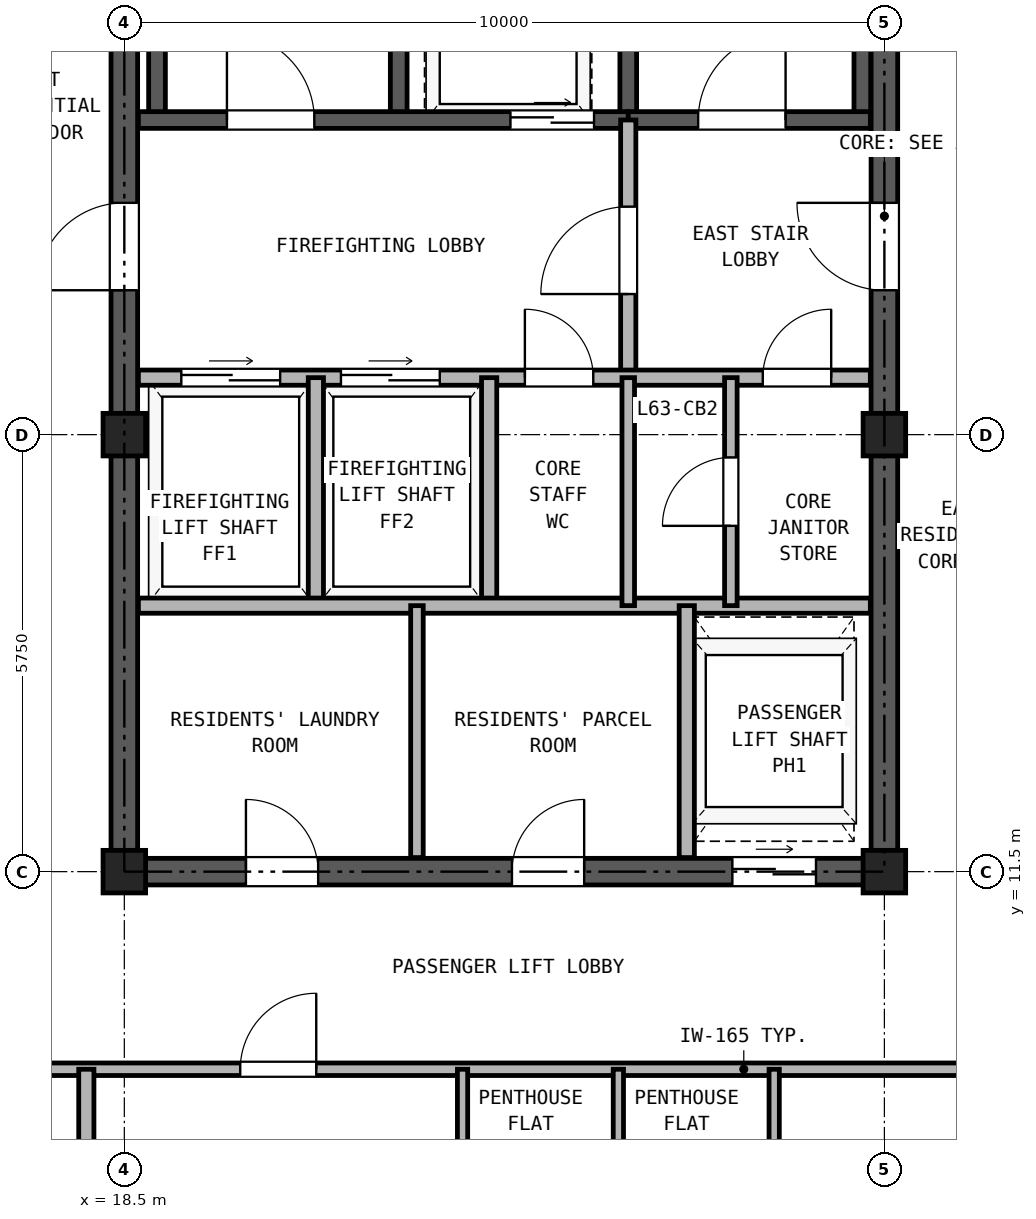
"""IFC4 building model, lengths in metres.
Left out: names, types, materials, properties, quantities, classifications, styles, units other than length and angle.
Written with IfcOpenShell. Run it as: python <this file> out.ifc"""

import sys

from ifc_helpers import new_model, si_unit, direction, frame, frame_2d, origin, origin_2d, place, context, subcontext, project, spatial, rectangle, hollow_rectangle, extrude, source, transform, mapped, element, fill, save


model = new_model("IFC4")
c1 = context("Model", 3, precision=1e-05, world=origin(), true_north=direction((0.0, 1.0)))
c2 = subcontext(c1, "Body", "Model", "MODEL_VIEW")
j1 = project(units=[si_unit("LENGTHUNIT", "METRE"), si_unit("PLANEANGLEUNIT", "RADIAN")], contexts=[c1])
p1 = place(None, origin())
s1 = spatial("IfcSite", under=j1, at=p1, CompositionType="ELEMENT")
p2 = place(p1, origin())
s2 = spatial("IfcBuilding", under=s1, at=p2, CompositionType="ELEMENT")
p3 = place(p2, frame((0.0, 0.0, 223.3)))
s3 = spatial("IfcBuildingStorey", under=s2, at=p3, CompositionType="ELEMENT", Elevation=223.3)
m1 = source(origin(), c2, "Body", "SweptSolid", [
    extrude(hollow_rectangle(XDim=0.56, YDim=0.56, WallThickness=0.03, at=origin_2d()), origin(), (0.0, 0.0, 1.0), 2.98),
])
for number, where, z_axis, x_axis in (
    (1, (18.5, 11.5, 0.0), (0.0, 0.0, 1.0), (1.0, 0.0, 0.0)),
    (2, (18.5, 17.25, 0.0), (0.0, 0.0, 1.0), (1.0, 0.0, 0.0)),
    (3, (28.5, 11.5, 0.0), (0.0, 0.0, 1.0), (1.0, 0.0, 0.0)),
    (4, (28.5, 17.25, 0.0), (0.0, 0.0, 1.0), (1.0, 0.0, 0.0)),
):
    element("IfcColumn", number, at=place(p3, frame(where, z_axis=z_axis, x_axis=x_axis)), inside=s3, PredefinedType="COLUMN", context=c2, shape_type="MappedRepresentation", body=[
        mapped(m1, transform((0.0, 0.0, 0.0), x_axis=(1.0, 0.0, 0.0), y_axis=(0.0, 1.0, 0.0), z_axis=(0.0, 0.0, 1.0), scale=1.0)),
    ])
p4 = place(p3, frame((18.325, 11.5, 0.0), z_axis=(0.0, 0.0, 1.0), x_axis=(1.0, 0.0, 0.0)))
e5 = element("IfcWall", 5, at=p4, inside=s3, PredefinedType="SHEAR", context=c2, shape_type="SweptSolid", body=[
    extrude(rectangle(XDim=10.35, YDim=0.35, at=frame_2d((5.175, 0.0))), origin(), (0.0, 0.0, 1.0), 2.98),
])
p5 = place(p4, frame((1.775, 0.0, 0.0)))
e6 = element("IfcOpeningElement", 6, at=p5, cuts=e5, PredefinedType="OPENING", context=c2, shape_type="SweptSolid", body=[
    extrude(rectangle(XDim=0.95, YDim=2.15, at=frame_2d((0.475, 1.075))), frame((0.0, 0.185, 0.0), z_axis=(0.0, -1.0, 0.0), x_axis=(1.0, 0.0, 0.0)), (0.0, 0.0, 1.0), 0.37),
])
p6 = place(p4, frame((5.275, 0.0, 0.0)))
e7 = element("IfcOpeningElement", 7, at=p6, cuts=e5, PredefinedType="OPENING", context=c2, shape_type="SweptSolid", body=[
    extrude(rectangle(XDim=0.95, YDim=2.15, at=frame_2d((0.475, 1.075))), frame((0.0, 0.185, 0.0), z_axis=(0.0, -1.0, 0.0), x_axis=(1.0, 0.0, 0.0)), (0.0, 0.0, 1.0), 0.37),
])
p7 = place(p4, frame((8.175, 0.0, 0.0)))
e8 = element("IfcOpeningElement", 8, at=p7, cuts=e5, PredefinedType="OPENING", context=c2, shape_type="SweptSolid", body=[
    extrude(rectangle(XDim=1.1, YDim=2.25, at=frame_2d((0.55, 1.125))), frame((0.0, 0.185, 0.0), z_axis=(0.0, -1.0, 0.0), x_axis=(1.0, 0.0, 0.0)), (0.0, 0.0, 1.0), 0.37),
])
p8 = place(p3, frame((18.5, 11.675, 0.0), z_axis=(0.0, 0.0, 1.0), x_axis=(0.0, 1.0, 0.0)))
e9 = element("IfcWall", 9, at=p8, inside=s3, PredefinedType="SHEAR", context=c2, shape_type="SweptSolid", body=[
    extrude(rectangle(XDim=16.9, YDim=0.35, at=frame_2d((8.45, 0.0))), origin(), (0.0, 0.0, 1.0), 2.98),
])
p9 = place(p8, frame((7.475, 0.0, 0.0)))
e10 = element("IfcOpeningElement", 10, at=p9, cuts=e9, PredefinedType="OPENING", context=c2, shape_type="SweptSolid", body=[
    extrude(rectangle(XDim=1.15, YDim=2.2, at=frame_2d((0.575, 1.1))), frame((0.0, 0.185, 0.0), z_axis=(0.0, -1.0, 0.0), x_axis=(1.0, 0.0, 0.0)), (0.0, 0.0, 1.0), 0.37),
])
p10 = place(p3, frame((28.5, 11.675, 0.0), z_axis=(0.0, 0.0, 1.0), x_axis=(0.0, 1.0, 0.0)))
e11 = element("IfcWall", 11, at=p10, inside=s3, PredefinedType="SHEAR", context=c2, shape_type="SweptSolid", body=[
    extrude(rectangle(XDim=16.9, YDim=0.35, at=frame_2d((8.45, 0.0))), origin(), (0.0, 0.0, 1.0), 2.98),
])
p11 = place(p10, frame((7.475, 0.0, 0.0)))
e12 = element("IfcOpeningElement", 12, at=p11, cuts=e11, PredefinedType="OPENING", context=c2, shape_type="SweptSolid", body=[
    extrude(rectangle(XDim=1.15, YDim=2.2, at=frame_2d((0.575, 1.1))), frame((0.0, 0.185, 0.0), z_axis=(0.0, -1.0, 0.0), x_axis=(1.0, 0.0, 0.0)), (0.0, 0.0, 1.0), 0.37),
])
for number, where, z_axis, x_axis in (
    (13, (18.93, 21.39, 0.0), (0.0, 0.0, 1.0), (0.0, 1.0, 0.0)),
    (14, (22.11, 21.39, 0.0), (0.0, 0.0, 1.0), (0.0, 1.0, 0.0)),
    (15, (25.13, 21.39, 0.0), (0.0, 0.0, 1.0), (0.0, 1.0, 0.0)),
):
    element("IfcWall", number, at=place(p3, frame(where, z_axis=z_axis, x_axis=x_axis)), inside=s3, PredefinedType="SOLIDWALL", context=c2, shape_type="SweptSolid", body=[
        extrude(rectangle(XDim=7.11, YDim=0.22, at=frame_2d((3.555, 0.0))), origin(), (0.0, 0.0, 1.0), 2.98),
    ])
p12 = place(p3, frame((28.21, 21.39, 0.0), z_axis=(0.0, 0.0, 1.0), x_axis=(0.0, 1.0, 0.0)))
e16 = element("IfcWall", 16, at=p12, inside=s3, PredefinedType="SOLIDWALL", context=c2, shape_type="SweptSolid", body=[
    extrude(rectangle(XDim=6.945, YDim=0.22, at=frame_2d((3.473, 0.0))), origin(), (0.0, 0.0, 1.0), 2.98),
])
p13 = place(p3, frame((18.685, 21.39, 0.0), z_axis=(0.0, 0.0, 1.0), x_axis=(1.0, 0.0, 0.0)))
e17 = element("IfcWall", 17, at=p13, inside=s3, PredefinedType="SOLIDWALL", context=c2, shape_type="SweptSolid", body=[
    extrude(rectangle(XDim=6.445, YDim=0.22, at=frame_2d((3.222, 0.0))), origin(), (0.0, 0.0, 1.0), 2.98),
])
p14 = place(p13, frame((1.165, 0.0, 0.0)))
e18 = element("IfcOpeningElement", 18, at=p14, cuts=e17, PredefinedType="OPENING", context=c2, shape_type="SweptSolid", body=[
    extrude(rectangle(XDim=1.15, YDim=2.2, at=frame_2d((0.575, 1.1))), frame((0.0, 0.12, 0.0), z_axis=(0.0, -1.0, 0.0), x_axis=(1.0, 0.0, 0.0)), (0.0, 0.0, 1.0), 0.24),
])
p15 = place(p13, frame((4.895, 0.0, 0.0)))
e19 = element("IfcOpeningElement", 19, at=p15, cuts=e17, PredefinedType="OPENING", context=c2, shape_type="SweptSolid", body=[
    extrude(rectangle(XDim=1.1, YDim=2.25, at=frame_2d((0.55, 1.125))), frame((0.0, 0.12, 0.0), z_axis=(0.0, -1.0, 0.0), x_axis=(1.0, 0.0, 0.0)), (0.0, 0.0, 1.0), 0.24),
])
p16 = place(p3, frame((25.13, 21.39, 0.0), z_axis=(0.0, 0.0, 1.0), x_axis=(1.0, 0.0, 0.0)))
e20 = element("IfcWall", 20, at=p16, inside=s3, PredefinedType="SOLIDWALL", context=c2, shape_type="SweptSolid", body=[
    extrude(rectangle(XDim=3.185, YDim=0.22, at=frame_2d((1.593, 0.0))), origin(), (0.0, 0.0, 1.0), 2.98),
])
p17 = place(p16, frame((0.92, 0.0, 0.0)))
e21 = element("IfcOpeningElement", 21, at=p17, cuts=e20, PredefinedType="OPENING", context=c2, shape_type="SweptSolid", body=[
    extrude(rectangle(XDim=1.15, YDim=2.2, at=frame_2d((0.575, 1.1))), frame((0.0, 0.12, 0.0), z_axis=(0.0, -1.0, 0.0), x_axis=(1.0, 0.0, 0.0)), (0.0, 0.0, 1.0), 0.24),
])
p18 = place(p3, frame((25.13, 18.0, 0.0), z_axis=(0.0, 0.0, 1.0), x_axis=(0.0, 1.0, 0.0)))
e22 = element("IfcWall", 22, at=p18, inside=s3, PredefinedType="PARTITIONING", context=c2, shape_type="SweptSolid", body=[
    extrude(rectangle(XDim=3.39, YDim=0.2, at=frame_2d((1.695, 0.0))), origin(), (0.0, 0.0, 1.0), 2.98),
])
p19 = place(p18, frame((1.1, 0.0, 0.0)))
e23 = element("IfcOpeningElement", 23, at=p19, cuts=e22, PredefinedType="OPENING", context=c2, shape_type="SweptSolid", body=[
    extrude(rectangle(XDim=1.15, YDim=2.2, at=frame_2d((0.575, 1.1))), frame((0.0, 0.11, 0.0), z_axis=(0.0, -1.0, 0.0), x_axis=(1.0, 0.0, 0.0)), (0.0, 0.0, 1.0), 0.22),
])
p20 = place(p3, frame((18.685, 18.0, 0.0), z_axis=(0.0, 0.0, 1.0), x_axis=(1.0, 0.0, 0.0)))
e24 = element("IfcWall", 24, at=p20, inside=s3, PredefinedType="PARTITIONING", context=c2, shape_type="SweptSolid", body=[
    extrude(rectangle(XDim=9.63, YDim=0.2, at=frame_2d((4.815, 0.0))), origin(), (0.0, 0.0, 1.0), 2.98),
])
p21 = place(p20, frame((0.565, 0.0, 0.0)))
e25 = element("IfcOpeningElement", 25, at=p21, cuts=e24, PredefinedType="OPENING", context=c2, shape_type="SweptSolid", body=[
    extrude(rectangle(XDim=1.3, YDim=2.3, at=frame_2d((0.65, 1.15))), frame((0.0, 0.11, 0.0), z_axis=(0.0, -1.0, 0.0), x_axis=(1.0, 0.0, 0.0)), (0.0, 0.0, 1.0), 0.22),
])
p22 = place(p20, frame((2.665, 0.0, 0.0)))
e26 = element("IfcOpeningElement", 26, at=p22, cuts=e24, PredefinedType="OPENING", context=c2, shape_type="SweptSolid", body=[
    extrude(rectangle(XDim=1.3, YDim=2.3, at=frame_2d((0.65, 1.15))), frame((0.0, 0.11, 0.0), z_axis=(0.0, -1.0, 0.0), x_axis=(1.0, 0.0, 0.0)), (0.0, 0.0, 1.0), 0.22),
])
p23 = place(p20, frame((5.085, 0.0, 0.0)))
e27 = element("IfcOpeningElement", 27, at=p23, cuts=e24, PredefinedType="OPENING", context=c2, shape_type="SweptSolid", body=[
    extrude(rectangle(XDim=0.9, YDim=2.05, at=frame_2d((0.45, 1.025))), frame((0.0, 0.11, 0.0), z_axis=(0.0, -1.0, 0.0), x_axis=(1.0, 0.0, 0.0)), (0.0, 0.0, 1.0), 0.22),
])
p24 = place(p20, frame((8.215, 0.0, 0.0)))
e28 = element("IfcOpeningElement", 28, at=p24, cuts=e24, PredefinedType="OPENING", context=c2, shape_type="SweptSolid", body=[
    extrude(rectangle(XDim=0.9, YDim=2.05, at=frame_2d((0.45, 1.025))), frame((0.0, 0.11, 0.0), z_axis=(0.0, -1.0, 0.0), x_axis=(1.0, 0.0, 0.0)), (0.0, 0.0, 1.0), 0.22),
])
for number, where, z_axis, x_axis in (
    (29, (21.02, 15.0, 0.0), (0.0, 0.0, 1.0), (0.0, 1.0, 0.0)),
    (30, (23.3, 15.0, 0.0), (0.0, 0.0, 1.0), (0.0, 1.0, 0.0)),
):
    element("IfcWall", number, at=place(p3, frame(where, z_axis=z_axis, x_axis=x_axis)), inside=s3, PredefinedType="PARTITIONING", context=c2, shape_type="SweptSolid", body=[
        extrude(rectangle(XDim=3.0, YDim=0.2, at=frame_2d((1.5, 0.0))), origin(), (0.0, 0.0, 1.0), 2.98),
    ])
p25 = place(p3, frame((18.685, 15.0, 0.0), z_axis=(0.0, 0.0, 1.0), x_axis=(1.0, 0.0, 0.0)))
e31 = element("IfcWall", 31, at=p25, inside=s3, PredefinedType="PARTITIONING", context=c2, shape_type="SweptSolid", body=[
    extrude(rectangle(XDim=9.63, YDim=0.2, at=frame_2d((4.815, 0.0))), origin(), (0.0, 0.0, 1.0), 2.98),
])
p26 = place(p3, frame((25.13, 15.0, 0.0), z_axis=(0.0, 0.0, 1.0), x_axis=(0.0, 1.0, 0.0)))
e32 = element("IfcWall", 32, at=p26, inside=s3, PredefinedType="PARTITIONING", context=c2, shape_type="SweptSolid", body=[
    extrude(rectangle(XDim=3.0, YDim=0.165, at=frame_2d((1.5, 0.0))), origin(), (0.0, 0.0, 1.0), 2.98),
])
p27 = place(p3, frame((26.48, 15.0, 0.0), z_axis=(0.0, 0.0, 1.0), x_axis=(0.0, 1.0, 0.0)))
e33 = element("IfcWall", 33, at=p27, inside=s3, PredefinedType="PARTITIONING", context=c2, shape_type="SweptSolid", body=[
    extrude(rectangle(XDim=3.0, YDim=0.165, at=frame_2d((1.5, 0.0))), origin(), (0.0, 0.0, 1.0), 2.98),
])
p28 = place(p27, frame((1.05, 0.0, 0.0)))
e34 = element("IfcOpeningElement", 34, at=p28, cuts=e33, PredefinedType="OPENING", context=c2, shape_type="SweptSolid", body=[
    extrude(rectangle(XDim=0.9, YDim=2.05, at=frame_2d((0.45, 1.025))), frame((0.0, 0.093, 0.0), z_axis=(0.0, -1.0, 0.0), x_axis=(1.0, 0.0, 0.0)), (0.0, 0.0, 1.0), 0.185),
])
p29 = place(p3, frame((22.35, 11.685, 0.0), z_axis=(0.0, 0.0, 1.0), x_axis=(0.0, 1.0, 0.0)))
e35 = element("IfcWall", 35, at=p29, inside=s3, PredefinedType="PARTITIONING", context=c2, shape_type="SweptSolid", body=[
    extrude(rectangle(XDim=3.315, YDim=0.165, at=frame_2d((1.657, 0.0))), origin(), (0.0, 0.0, 1.0), 2.98),
])
p30 = place(p3, frame((25.9, 11.685, 0.0), z_axis=(0.0, 0.0, 1.0), x_axis=(0.0, 1.0, 0.0)))
e36 = element("IfcWall", 36, at=p30, inside=s3, PredefinedType="PARTITIONING", context=c2, shape_type="SweptSolid", body=[
    extrude(rectangle(XDim=3.315, YDim=0.2, at=frame_2d((1.657, 0.0))), origin(), (0.0, 0.0, 1.0), 2.98),
])
p31 = place(p3, frame((5.36, 8.9, 0.0), z_axis=(0.0, 0.0, 1.0), x_axis=(1.0, 0.0, 0.0)))
e37 = element("IfcWall", 37, at=p31, inside=s3, PredefinedType="PARTITIONING", context=c2, shape_type="SweptSolid", body=[
    extrude(rectangle(XDim=36.28, YDim=0.165, at=frame_2d((18.14, 0.0))), origin(), (0.0, 0.0, 1.0), 2.98),
])
p32 = place(p31, frame((8.865, 0.0, 0.0)))
e38 = element("IfcOpeningElement", 38, at=p32, cuts=e37, PredefinedType="OPENING", context=c2, shape_type="SweptSolid", body=[
    extrude(rectangle(XDim=1.0, YDim=2.15, at=frame_2d((0.5, 1.075))), frame((0.0, 0.093, 0.0), z_axis=(0.0, -1.0, 0.0), x_axis=(1.0, 0.0, 0.0)), (0.0, 0.0, 1.0), 0.185),
])
p33 = place(p31, frame((14.665, 0.0, 0.0)))
e39 = element("IfcOpeningElement", 39, at=p33, cuts=e37, PredefinedType="OPENING", context=c2, shape_type="SweptSolid", body=[
    extrude(rectangle(XDim=1.0, YDim=2.15, at=frame_2d((0.5, 1.075))), frame((0.0, 0.093, 0.0), z_axis=(0.0, -1.0, 0.0), x_axis=(1.0, 0.0, 0.0)), (0.0, 0.0, 1.0), 0.185),
])
p34 = place(p31, frame((26.915, 0.0, 0.0)))
e40 = element("IfcOpeningElement", 40, at=p34, cuts=e37, PredefinedType="OPENING", context=c2, shape_type="SweptSolid", body=[
    extrude(rectangle(XDim=1.0, YDim=2.15, at=frame_2d((0.5, 1.075))), frame((0.0, 0.093, 0.0), z_axis=(0.0, -1.0, 0.0), x_axis=(1.0, 0.0, 0.0)), (0.0, 0.0, 1.0), 0.185),
])
p35 = place(p3, frame((18.0, 0.16, 0.0), z_axis=(0.0, 0.0, 1.0), x_axis=(0.0, 1.0, 0.0)))
e41 = element("IfcWall", 41, at=p35, inside=s3, PredefinedType="PARTITIONING", context=c2, shape_type="SweptSolid", body=[
    extrude(rectangle(XDim=8.74, YDim=0.2, at=frame_2d((4.37, 0.0))), origin(), (0.0, 0.0, 1.0), 2.98),
])
for number, where, z_axis, x_axis in (
    (42, (22.95, 6.75, 0.0), (0.0, 0.0, 1.0), (0.0, 1.0, 0.0)),
    (43, (25.0, 6.75, 0.0), (0.0, 0.0, 1.0), (0.0, 1.0, 0.0)),
    (44, (27.05, 6.75, 0.0), (0.0, 0.0, 1.0), (0.0, 1.0, 0.0)),
):
    element("IfcWall", number, at=place(p3, frame(where, z_axis=z_axis, x_axis=x_axis)), inside=s3, PredefinedType="PARTITIONING", context=c2, shape_type="SweptSolid", body=[
        extrude(rectangle(XDim=2.15, YDim=0.135, at=frame_2d((1.075, 0.0))), origin(), (0.0, 0.0, 1.0), 2.98),
    ])
p36 = place(p14, frame((1.15, 0.0, 0.0), z_axis=(0.0, 0.0, 1.0), x_axis=(-1.0, 0.0, 0.0)))
e45 = element("IfcDoor", 45, at=p36, inside=s3, OperationType="SINGLE_SWING_LEFT", PredefinedType="DOOR", context=c2, shape_type="SweptSolid", body=[
    extrude(rectangle(XDim=1.15, YDim=2.2, at=frame_2d((0.575, 1.1))), frame((0.0, 0.025, 0.0), z_axis=(0.0, -1.0, 0.0), x_axis=(1.0, 0.0, 0.0)), (0.0, 0.0, 1.0), 0.05),
])
fill(e18, e45)
p37 = place(p17, frame((1.15, 0.0, 0.0), z_axis=(0.0, 0.0, 1.0), x_axis=(-1.0, 0.0, 0.0)))
e46 = element("IfcDoor", 46, at=p37, inside=s3, OperationType="SINGLE_SWING_RIGHT", PredefinedType="DOOR", context=c2, shape_type="SweptSolid", body=[
    extrude(rectangle(XDim=1.15, YDim=2.2, at=frame_2d((0.575, 1.1))), frame((0.0, 0.025, 0.0), z_axis=(0.0, -1.0, 0.0), x_axis=(1.0, 0.0, 0.0)), (0.0, 0.0, 1.0), 0.05),
])
fill(e21, e46)
p38 = place(p15, frame((1.1, 0.0, 0.0), z_axis=(0.0, 0.0, 1.0), x_axis=(-1.0, 0.0, 0.0)))
e47 = element("IfcDoor", 47, at=p38, inside=s3, OperationType="DOUBLE_DOOR_SLIDING", PredefinedType="DOOR", context=c2, shape_type="SweptSolid", body=[
    extrude(rectangle(XDim=1.1, YDim=2.25, at=frame_2d((0.55, 1.125))), frame((0.0, 0.025, 0.0), z_axis=(0.0, -1.0, 0.0), x_axis=(1.0, 0.0, 0.0)), (0.0, 0.0, 1.0), 0.05),
])
fill(e19, e47)
p39 = place(p19, origin())
e48 = element("IfcDoor", 48, at=p39, inside=s3, OperationType="SINGLE_SWING_LEFT", PredefinedType="DOOR", context=c2, shape_type="SweptSolid", body=[
    extrude(rectangle(XDim=1.15, YDim=2.2, at=frame_2d((0.575, 1.1))), frame((0.0, 0.025, 0.0), z_axis=(0.0, -1.0, 0.0), x_axis=(1.0, 0.0, 0.0)), (0.0, 0.0, 1.0), 0.05),
])
fill(e23, e48)
p40 = place(p21, origin())
e49 = element("IfcDoor", 49, at=p40, inside=s3, OperationType="DOUBLE_DOOR_SLIDING", PredefinedType="DOOR", context=c2, shape_type="SweptSolid", body=[
    extrude(rectangle(XDim=1.3, YDim=2.3, at=frame_2d((0.65, 1.15))), frame((0.0, 0.025, 0.0), z_axis=(0.0, -1.0, 0.0), x_axis=(1.0, 0.0, 0.0)), (0.0, 0.0, 1.0), 0.05),
])
fill(e25, e49)
p41 = place(p22, origin())
e50 = element("IfcDoor", 50, at=p41, inside=s3, OperationType="DOUBLE_DOOR_SLIDING", PredefinedType="DOOR", context=c2, shape_type="SweptSolid", body=[
    extrude(rectangle(XDim=1.3, YDim=2.3, at=frame_2d((0.65, 1.15))), frame((0.0, 0.025, 0.0), z_axis=(0.0, -1.0, 0.0), x_axis=(1.0, 0.0, 0.0)), (0.0, 0.0, 1.0), 0.05),
])
fill(e26, e50)
p42 = place(p23, frame((0.9, 0.0, 0.0), z_axis=(0.0, 0.0, 1.0), x_axis=(-1.0, 0.0, 0.0)))
e51 = element("IfcDoor", 51, at=p42, inside=s3, OperationType="SINGLE_SWING_LEFT", PredefinedType="DOOR", context=c2, shape_type="SweptSolid", body=[
    extrude(rectangle(XDim=0.9, YDim=2.05, at=frame_2d((0.45, 1.025))), frame((0.0, 0.025, 0.0), z_axis=(0.0, -1.0, 0.0), x_axis=(1.0, 0.0, 0.0)), (0.0, 0.0, 1.0), 0.05),
])
fill(e27, e51)
p43 = place(p28, origin())
e52 = element("IfcDoor", 52, at=p43, inside=s3, OperationType="SINGLE_SWING_LEFT", PredefinedType="DOOR", context=c2, shape_type="SweptSolid", body=[
    extrude(rectangle(XDim=0.9, YDim=2.05, at=frame_2d((0.45, 1.025))), frame((0.0, 0.025, 0.0), z_axis=(0.0, -1.0, 0.0), x_axis=(1.0, 0.0, 0.0)), (0.0, 0.0, 1.0), 0.05),
])
fill(e34, e52)
p44 = place(p24, frame((0.9, 0.0, 0.0), z_axis=(0.0, 0.0, 1.0), x_axis=(-1.0, 0.0, 0.0)))
e53 = element("IfcDoor", 53, at=p44, inside=s3, OperationType="SINGLE_SWING_RIGHT", PredefinedType="DOOR", context=c2, shape_type="SweptSolid", body=[
    extrude(rectangle(XDim=0.9, YDim=2.05, at=frame_2d((0.45, 1.025))), frame((0.0, 0.025, 0.0), z_axis=(0.0, -1.0, 0.0), x_axis=(1.0, 0.0, 0.0)), (0.0, 0.0, 1.0), 0.05),
])
fill(e28, e53)
p45 = place(p9, frame((1.15, 0.0, 0.0), z_axis=(0.0, 0.0, 1.0), x_axis=(-1.0, 0.0, 0.0)))
e54 = element("IfcDoor", 54, at=p45, inside=s3, OperationType="SINGLE_SWING_LEFT", PredefinedType="DOOR", context=c2, shape_type="SweptSolid", body=[
    extrude(rectangle(XDim=1.15, YDim=2.2, at=frame_2d((0.575, 1.1))), frame((0.0, 0.025, 0.0), z_axis=(0.0, -1.0, 0.0), x_axis=(1.0, 0.0, 0.0)), (0.0, 0.0, 1.0), 0.05),
])
fill(e10, e54)
p46 = place(p11, origin())
e55 = element("IfcDoor", 55, at=p46, inside=s3, OperationType="SINGLE_SWING_RIGHT", PredefinedType="DOOR", context=c2, shape_type="SweptSolid", body=[
    extrude(rectangle(XDim=1.15, YDim=2.2, at=frame_2d((0.575, 1.1))), frame((0.0, 0.025, 0.0), z_axis=(0.0, -1.0, 0.0), x_axis=(1.0, 0.0, 0.0)), (0.0, 0.0, 1.0), 0.05),
])
fill(e12, e55)
p47 = place(p5, frame((0.95, 0.0, 0.0), z_axis=(0.0, 0.0, 1.0), x_axis=(-1.0, 0.0, 0.0)))
e56 = element("IfcDoor", 56, at=p47, inside=s3, OperationType="SINGLE_SWING_LEFT", PredefinedType="DOOR", context=c2, shape_type="SweptSolid", body=[
    extrude(rectangle(XDim=0.95, YDim=2.15, at=frame_2d((0.475, 1.075))), frame((0.0, 0.025, 0.0), z_axis=(0.0, -1.0, 0.0), x_axis=(1.0, 0.0, 0.0)), (0.0, 0.0, 1.0), 0.05),
])
fill(e6, e56)
p48 = place(p6, frame((0.95, 0.0, 0.0), z_axis=(0.0, 0.0, 1.0), x_axis=(-1.0, 0.0, 0.0)))
e57 = element("IfcDoor", 57, at=p48, inside=s3, OperationType="SINGLE_SWING_RIGHT", PredefinedType="DOOR", context=c2, shape_type="SweptSolid", body=[
    extrude(rectangle(XDim=0.95, YDim=2.15, at=frame_2d((0.475, 1.075))), frame((0.0, 0.025, 0.0), z_axis=(0.0, -1.0, 0.0), x_axis=(1.0, 0.0, 0.0)), (0.0, 0.0, 1.0), 0.05),
])
fill(e7, e57)
p49 = place(p7, frame((1.1, 0.0, 0.0), z_axis=(0.0, 0.0, 1.0), x_axis=(-1.0, 0.0, 0.0)))
e58 = element("IfcDoor", 58, at=p49, inside=s3, OperationType="DOUBLE_DOOR_SLIDING", PredefinedType="DOOR", context=c2, shape_type="SweptSolid", body=[
    extrude(rectangle(XDim=1.1, YDim=2.25, at=frame_2d((0.55, 1.125))), frame((0.0, 0.025, 0.0), z_axis=(0.0, -1.0, 0.0), x_axis=(1.0, 0.0, 0.0)), (0.0, 0.0, 1.0), 0.05),
])
fill(e8, e58)
p50 = place(p33, frame((1.0, 0.0, 0.0), z_axis=(0.0, 0.0, 1.0), x_axis=(-1.0, 0.0, 0.0)))
e59 = element("IfcDoor", 59, at=p50, inside=s3, OperationType="SINGLE_SWING_RIGHT", PredefinedType="DOOR", context=c2, shape_type="SweptSolid", body=[
    extrude(rectangle(XDim=1.0, YDim=2.15, at=frame_2d((0.5, 1.075))), frame((0.0, 0.025, 0.0), z_axis=(0.0, -1.0, 0.0), x_axis=(1.0, 0.0, 0.0)), (0.0, 0.0, 1.0), 0.05),
])
fill(e39, e59)
save(model, sys.argv[1])
